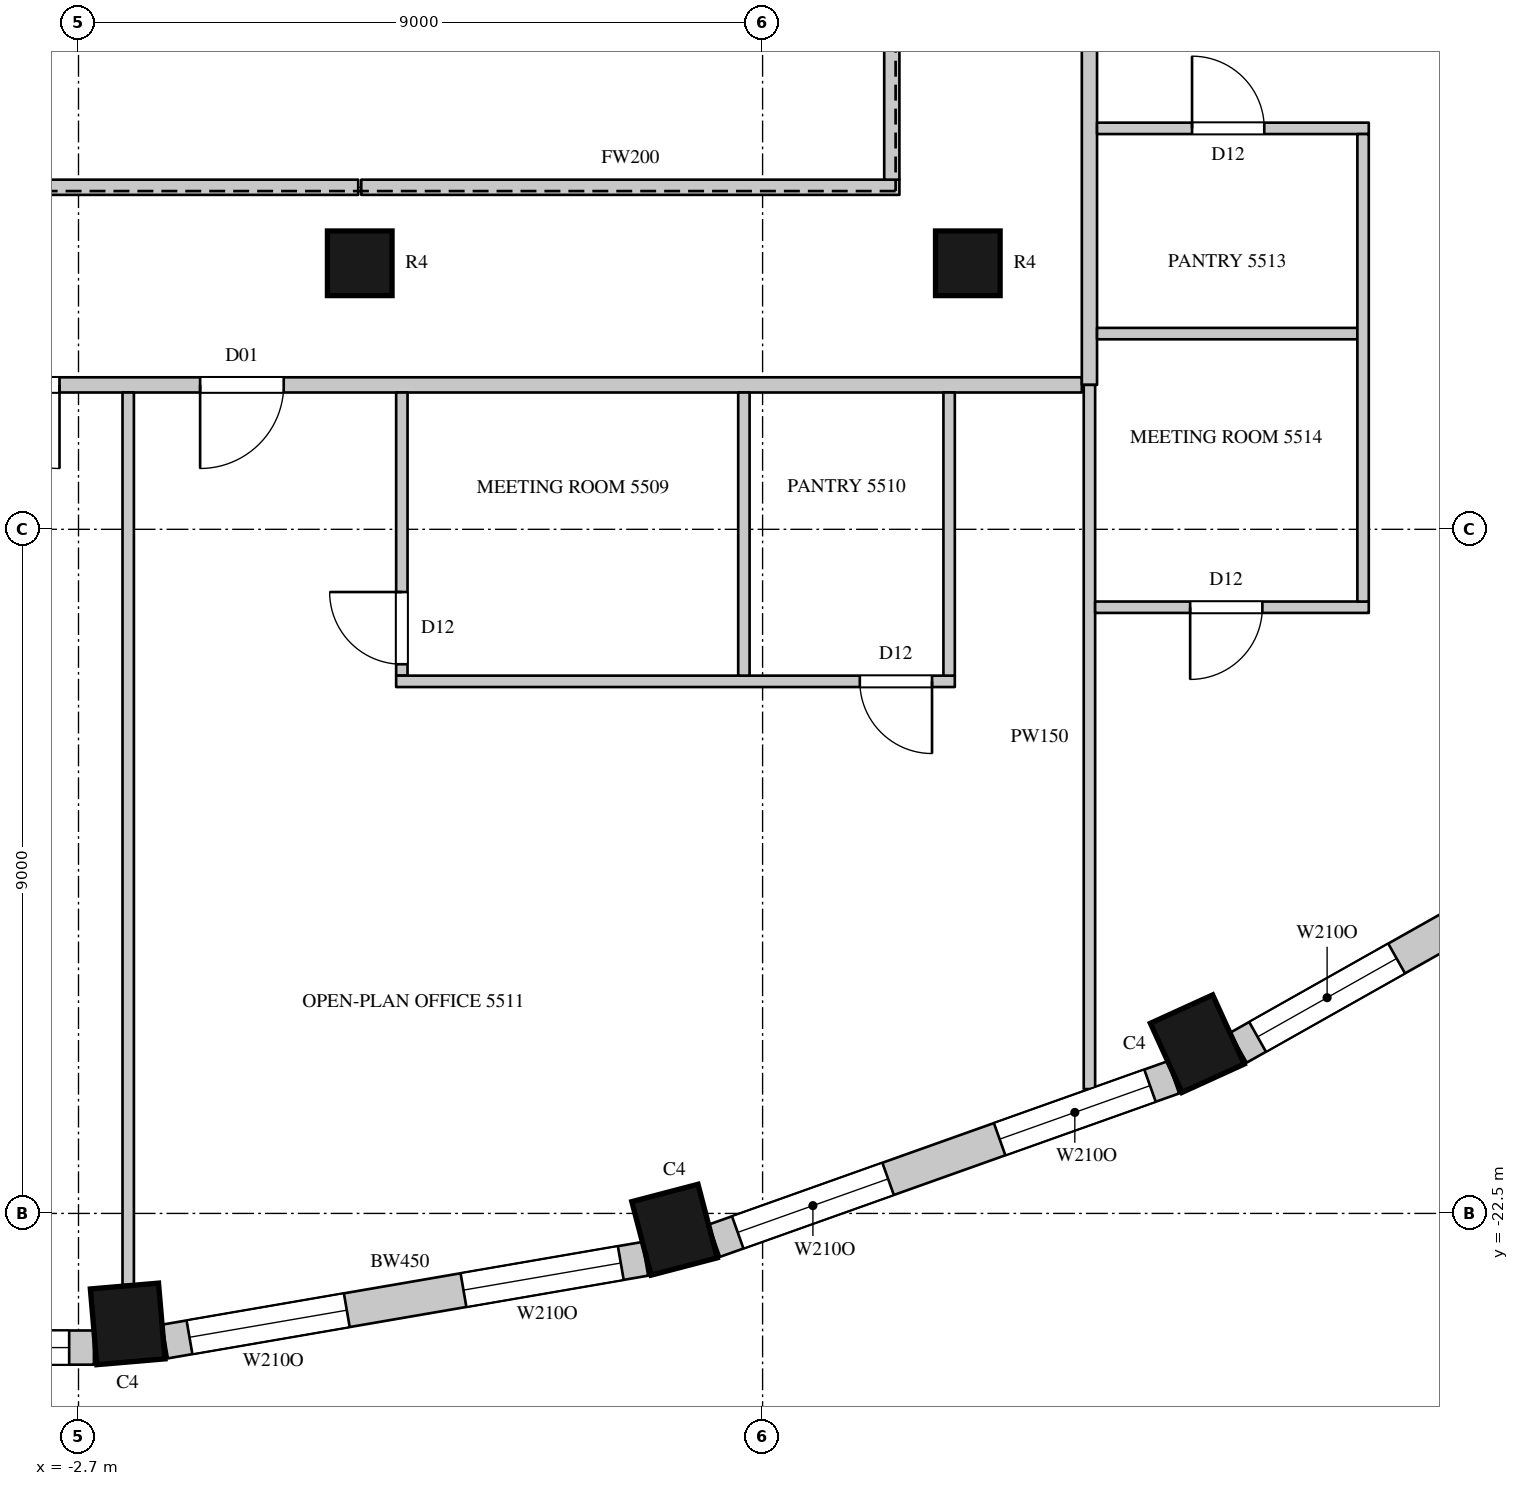
"""IFC4 building model, lengths in metres.
Left out: names, types, materials, properties, quantities, classifications, styles, units other than length and angle.
Written with IfcOpenShell. Run it as: python <this file> out.ifc"""

import sys

from ifc_helpers import new_model, si_unit, direction, frame, frame_2d, origin, origin_2d, place, context, subcontext, project, spatial, rectangle, circle, extrude, element, fill, save


model = new_model("IFC4")
c1 = context("Model", 3, precision=1e-05, world=origin(), true_north=direction((0.0, 1.0)))
c2 = subcontext(c1, "Body", "Model", "MODEL_VIEW")
j1 = project(units=[si_unit("LENGTHUNIT", "METRE"), si_unit("PLANEANGLEUNIT", "RADIAN")], contexts=[c1])
p1 = place(None, origin())
s1 = spatial("IfcSite", under=j1, at=p1, CompositionType="ELEMENT")
p2 = place(p1, origin())
s2 = spatial("IfcBuilding", under=s1, at=p2, CompositionType="ELEMENT")
p3 = place(p2, frame((0.0, 0.0, 247.5)))
s3 = spatial("IfcBuildingStorey", under=s2, at=p3, CompositionType="ELEMENT", Elevation=247.5)
for number, where, z_axis, x_axis in (
    (1, (-2.053, -23.954, 0.0), (0.0, 0.0, 1.0), (0.996, 0.085, 0.0)),
    (2, (5.142, -22.715, 0.0), (0.0, 0.0, 1.0), (0.967, 0.253, 0.0)),
    (3, (12.019, -20.267, 0.0), (0.0, 0.0, 1.0), (0.91, 0.415, 0.0)),
):
    element("IfcColumn", number, at=place(p3, frame(where, z_axis=z_axis, x_axis=x_axis)), inside=s3, PredefinedType="COLUMN", context=c2, shape_type="SweptSolid", body=[
        extrude(rectangle(XDim=0.9, YDim=1.0, at=origin_2d()), origin(), (0.0, 0.0, 1.0), 4.1),
    ])
for number, where, z_axis, x_axis in (
    (4, (1.0, -10.0, 0.0), (0.0, 0.0, 1.0), (1.0, 0.0, 0.0)),
    (5, (9.0, -10.0, 0.0), (0.0, 0.0, 1.0), (1.0, 0.0, 0.0)),
):
    element("IfcColumn", number, at=place(p3, frame(where, z_axis=z_axis, x_axis=x_axis)), inside=s3, PredefinedType="COLUMN", context=c2, shape_type="SweptSolid", body=[
        extrude(circle(Radius=0.425, at=origin_2d()), origin(), (0.0, 0.0, 1.0), 4.1),
    ])
p4 = place(p3, frame((-8.903, -24.265, 0.0), z_axis=(0.0, 0.0, 1.0), x_axis=(1.0, 0.0, 0.0)))
e6 = element("IfcWall", 6, at=p4, inside=s3, PredefinedType="SOLIDWALL", context=c2, shape_type="SweptSolid", body=[
    extrude(rectangle(XDim=6.406, YDim=0.45, at=frame_2d((3.203, 0.0))), origin(), (0.0, 0.0, 1.0), 3.8),
])
p5 = place(p4, frame((3.98, 0.0, 1.05)))
e7 = element("IfcOpeningElement", 7, at=p5, cuts=e6, PredefinedType="OPENING", context=c2, shape_type="SweptSolid", body=[
    extrude(rectangle(XDim=2.1, YDim=2.4, at=frame_2d((1.05, 1.2))), frame((0.0, 0.235, 0.0), z_axis=(0.0, -1.0, 0.0), x_axis=(1.0, 0.0, 0.0)), (0.0, 0.0, 1.0), 0.47),
])
p6 = place(p4, frame((1.214, 0.0, 1.05)))
e8 = element("IfcOpeningElement", 8, at=p6, cuts=e6, PredefinedType="OPENING", context=c2, shape_type="SweptSolid", body=[
    extrude(rectangle(XDim=1.2, YDim=2.4, at=frame_2d((0.6, 1.2))), frame((0.0, 0.235, 0.0), z_axis=(0.0, -1.0, 0.0), x_axis=(1.0, 0.0, 0.0)), (0.0, 0.0, 1.0), 0.47),
])
p7 = place(p3, frame((-1.562, -24.185, 0.0), z_axis=(0.0, 0.0, 1.0), x_axis=(0.985502073964, 0.169663379113, 0.0)))
e9 = element("IfcWall", 9, at=p7, inside=s3, PredefinedType="SOLIDWALL", context=c2, shape_type="SweptSolid", body=[
    extrude(rectangle(XDim=6.412, YDim=0.45, at=frame_2d((3.206, 0.0))), origin(), (0.0, 0.0, 1.0), 3.8),
])
p8 = place(p7, frame((0.327, 0.0, 1.05)))
e10 = element("IfcOpeningElement", 10, at=p8, cuts=e9, PredefinedType="OPENING", context=c2, shape_type="SweptSolid", body=[
    extrude(rectangle(XDim=2.1, YDim=2.4, at=frame_2d((1.05, 1.2))), frame((0.0, 0.235, 0.0), z_axis=(0.0, -1.0, 0.0), x_axis=(1.0, 0.0, 0.0)), (0.0, 0.0, 1.0), 0.47),
])
p9 = place(p7, frame((3.985, 0.0, 1.05)))
e11 = element("IfcOpeningElement", 11, at=p9, cuts=e9, PredefinedType="OPENING", context=c2, shape_type="SweptSolid", body=[
    extrude(rectangle(XDim=2.1, YDim=2.4, at=frame_2d((1.05, 1.2))), frame((0.0, 0.235, 0.0), z_axis=(0.0, -1.0, 0.0), x_axis=(1.0, 0.0, 0.0)), (0.0, 0.0, 1.0), 0.47),
])
p10 = place(p3, frame((5.665, -22.859, 0.0), z_axis=(0.0, 0.0, 1.0), x_axis=(0.942108340262, 0.335308626803, 0.0)))
e12 = element("IfcWall", 12, at=p10, inside=s3, PredefinedType="SOLIDWALL", context=c2, shape_type="SweptSolid", body=[
    extrude(rectangle(XDim=6.412, YDim=0.45, at=frame_2d((3.206, 0.0))), origin(), (0.0, 0.0, 1.0), 3.8),
])
p11 = place(p10, frame((0.327, 0.0, 1.05)))
e13 = element("IfcOpeningElement", 13, at=p11, cuts=e12, PredefinedType="OPENING", context=c2, shape_type="SweptSolid", body=[
    extrude(rectangle(XDim=2.1, YDim=2.4, at=frame_2d((1.05, 1.2))), frame((0.0, 0.235, 0.0), z_axis=(0.0, -1.0, 0.0), x_axis=(1.0, 0.0, 0.0)), (0.0, 0.0, 1.0), 0.47),
])
p12 = place(p10, frame((3.985, 0.0, 1.05)))
e14 = element("IfcOpeningElement", 14, at=p12, cuts=e12, PredefinedType="OPENING", context=c2, shape_type="SweptSolid", body=[
    extrude(rectangle(XDim=2.1, YDim=2.4, at=frame_2d((1.05, 1.2))), frame((0.0, 0.235, 0.0), z_axis=(0.0, -1.0, 0.0), x_axis=(1.0, 0.0, 0.0)), (0.0, 0.0, 1.0), 0.47),
])
p13 = place(p3, frame((12.559, -20.32, 0.0), z_axis=(0.0, 0.0, 1.0), x_axis=(0.871065783524, 0.491166367714, 0.0)))
e15 = element("IfcWall", 15, at=p13, inside=s3, PredefinedType="SOLIDWALL", context=c2, shape_type="SweptSolid", body=[
    extrude(rectangle(XDim=6.196, YDim=0.45, at=frame_2d((3.098, 0.0))), origin(), (0.0, 0.0, 1.0), 3.8),
])
p14 = place(p13, frame((0.291, 0.0, 1.05)))
e16 = element("IfcOpeningElement", 16, at=p14, cuts=e15, PredefinedType="OPENING", context=c2, shape_type="SweptSolid", body=[
    extrude(rectangle(XDim=2.1, YDim=2.4, at=frame_2d((1.05, 1.2))), frame((0.0, 0.235, 0.0), z_axis=(0.0, -1.0, 0.0), x_axis=(1.0, 0.0, 0.0)), (0.0, 0.0, 1.0), 0.47),
])
p15 = place(p13, frame((3.875, 0.0, 1.05)))
e17 = element("IfcOpeningElement", 17, at=p15, cuts=e15, PredefinedType="OPENING", context=c2, shape_type="SweptSolid", body=[
    extrude(rectangle(XDim=2.1, YDim=2.4, at=frame_2d((1.05, 1.2))), frame((0.0, 0.235, 0.0), z_axis=(0.0, -1.0, 0.0), x_axis=(1.0, 0.0, 0.0)), (0.0, 0.0, 1.0), 0.47),
])
p16 = place(p3, frame((-10.9, -11.6, 0.0), z_axis=(0.0, 0.0, 1.0), x_axis=(1.0, 0.0, 0.0)))
e18 = element("IfcWall", 18, at=p16, inside=s3, PredefinedType="PARTITIONING", context=c2, shape_type="SweptSolid", body=[
    extrude(rectangle(XDim=21.4, YDim=0.2, at=frame_2d((10.7, 0.0))), origin(), (0.0, 0.0, 1.0), 3.8),
])
p17 = place(p16, frame((0.95, 0.0, 0.0)))
e19 = element("IfcOpeningElement", 19, at=p17, cuts=e18, PredefinedType="OPENING", context=c2, shape_type="SweptSolid", body=[
    extrude(rectangle(XDim=0.9, YDim=2.2, at=frame_2d((0.45, 1.1))), frame((0.0, 0.11, 0.0), z_axis=(0.0, -1.0, 0.0), x_axis=(1.0, 0.0, 0.0)), (0.0, 0.0, 1.0), 0.22),
])
p18 = place(p16, frame((4.2, 0.0, 0.0)))
e20 = element("IfcOpeningElement", 20, at=p18, cuts=e18, PredefinedType="OPENING", context=c2, shape_type="SweptSolid", body=[
    extrude(rectangle(XDim=0.9, YDim=2.2, at=frame_2d((0.45, 1.1))), frame((0.0, 0.11, 0.0), z_axis=(0.0, -1.0, 0.0), x_axis=(1.0, 0.0, 0.0)), (0.0, 0.0, 1.0), 0.22),
])
p19 = place(p16, frame((6.85, 0.0, 0.0)))
e21 = element("IfcOpeningElement", 21, at=p19, cuts=e18, PredefinedType="OPENING", context=c2, shape_type="SweptSolid", body=[
    extrude(rectangle(XDim=1.1, YDim=2.4, at=frame_2d((0.55, 1.2))), frame((0.0, 0.11, 0.0), z_axis=(0.0, -1.0, 0.0), x_axis=(1.0, 0.0, 0.0)), (0.0, 0.0, 1.0), 0.22),
])
p20 = place(p16, frame((9.8, 0.0, 0.0)))
e22 = element("IfcOpeningElement", 22, at=p20, cuts=e18, PredefinedType="OPENING", context=c2, shape_type="SweptSolid", body=[
    extrude(rectangle(XDim=1.1, YDim=2.4, at=frame_2d((0.55, 1.2))), frame((0.0, 0.11, 0.0), z_axis=(0.0, -1.0, 0.0), x_axis=(1.0, 0.0, 0.0)), (0.0, 0.0, 1.0), 0.22),
])
for number, where, z_axis, x_axis in (
    (23, (-6.1, -9.0, 0.0), (0.0, 0.0, 1.0), (1.0, 0.0, 0.0)),
    (24, (1.02, -9.0, 0.0), (0.0, 0.0, 1.0), (1.0, 0.0, 0.0)),
):
    element("IfcWall", number, at=place(p3, frame(where, z_axis=z_axis, x_axis=x_axis)), inside=s3, PredefinedType="PARTITIONING", context=c2, shape_type="SweptSolid", body=[
        extrude(rectangle(XDim=7.08, YDim=0.2, at=frame_2d((3.54, 0.0))), origin(), (0.0, 0.0, 1.0), 3.8),
    ])
p21 = place(p3, frame((8.0, -8.9, 0.0), z_axis=(0.0, 0.0, 1.0), x_axis=(0.0, 1.0, 0.0)))
e25 = element("IfcWall", 25, at=p21, inside=s3, PredefinedType="PARTITIONING", context=c2, shape_type="SweptSolid", body=[
    extrude(rectangle(XDim=17.8, YDim=0.2, at=frame_2d((8.9, 0.0))), origin(), (0.0, 0.0, 1.0), 3.8),
])
p22 = place(p3, frame((10.6, -11.6, 0.0), z_axis=(0.0, 0.0, 1.0), x_axis=(0.0, 1.0, 0.0)))
e26 = element("IfcWall", 26, at=p22, inside=s3, PredefinedType="PARTITIONING", context=c2, shape_type="SweptSolid", body=[
    extrude(rectangle(XDim=23.7, YDim=0.2, at=frame_2d((11.85, 0.0))), origin(), (0.0, 0.0, 1.0), 3.8),
])
p23 = place(p22, frame((9.45, 0.0, 0.0)))
e27 = element("IfcOpeningElement", 27, at=p23, cuts=e26, PredefinedType="OPENING", context=c2, shape_type="SweptSolid", body=[
    extrude(rectangle(XDim=1.5, YDim=2.4, at=frame_2d((0.75, 1.2))), frame((0.0, 0.11, 0.0), z_axis=(0.0, -1.0, 0.0), x_axis=(1.0, 0.0, 0.0)), (0.0, 0.0, 1.0), 0.22),
])
p24 = place(p22, frame((19.45, 0.0, 0.0)))
e28 = element("IfcOpeningElement", 28, at=p24, cuts=e26, PredefinedType="OPENING", context=c2, shape_type="SweptSolid", body=[
    extrude(rectangle(XDim=1.1, YDim=2.4, at=frame_2d((0.55, 1.2))), frame((0.0, 0.11, 0.0), z_axis=(0.0, -1.0, 0.0), x_axis=(1.0, 0.0, 0.0)), (0.0, 0.0, 1.0), 0.22),
])
p25 = place(p22, frame((4.6, 0.0, 0.0)))
e29 = element("IfcOpeningElement", 29, at=p25, cuts=e26, PredefinedType="OPENING", context=c2, shape_type="SweptSolid", body=[
    extrude(rectangle(XDim=1.1, YDim=2.4, at=frame_2d((0.55, 1.2))), frame((0.0, 0.11, 0.0), z_axis=(0.0, -1.0, 0.0), x_axis=(1.0, 0.0, 0.0)), (0.0, 0.0, 1.0), 0.22),
])
p26 = place(p3, frame((-2.046, -23.441, 0.0), z_axis=(0.0, 0.0, 1.0), x_axis=(0.0, 1.0, 0.0)))
e30 = element("IfcWall", 30, at=p26, inside=s3, PredefinedType="PARTITIONING", context=c2, shape_type="SweptSolid", body=[
    extrude(rectangle(XDim=11.741, YDim=0.15, at=frame_2d((5.871, 0.0))), origin(), (0.0, 0.0, 1.0), 3.8),
])
p27 = place(p3, frame((1.554, -15.425, 0.0), z_axis=(0.0, 0.0, 1.0), x_axis=(0.0, 1.0, 0.0)))
e31 = element("IfcWall", 31, at=p27, inside=s3, PredefinedType="PARTITIONING", context=c2, shape_type="SweptSolid", body=[
    extrude(rectangle(XDim=3.725, YDim=0.15, at=frame_2d((1.863, 0.0))), origin(), (0.0, 0.0, 1.0), 3.8),
])
p28 = place(p27, frame((0.15, 0.0, 0.0)))
e32 = element("IfcOpeningElement", 32, at=p28, cuts=e31, PredefinedType="OPENING", context=c2, shape_type="SweptSolid", body=[
    extrude(rectangle(XDim=0.95, YDim=2.2, at=frame_2d((0.475, 1.1))), frame((0.0, 0.085, 0.0), z_axis=(0.0, -1.0, 0.0), x_axis=(1.0, 0.0, 0.0)), (0.0, 0.0, 1.0), 0.17),
])
p29 = place(p3, frame((1.479, -15.5, 0.0), z_axis=(0.0, 0.0, 1.0), x_axis=(1.0, 0.0, 0.0)))
e33 = element("IfcWall", 33, at=p29, inside=s3, PredefinedType="PARTITIONING", context=c2, shape_type="SweptSolid", body=[
    extrude(rectangle(XDim=7.35, YDim=0.15, at=frame_2d((3.675, 0.0))), origin(), (0.0, 0.0, 1.0), 3.8),
])
p30 = place(p29, frame((6.1, 0.0, 0.0)))
e34 = element("IfcOpeningElement", 34, at=p30, cuts=e33, PredefinedType="OPENING", context=c2, shape_type="SweptSolid", body=[
    extrude(rectangle(XDim=0.95, YDim=2.2, at=frame_2d((0.475, 1.1))), frame((0.0, 0.085, 0.0), z_axis=(0.0, -1.0, 0.0), x_axis=(1.0, 0.0, 0.0)), (0.0, 0.0, 1.0), 0.17),
])
for number, where, z_axis, x_axis in (
    (35, (6.054, -15.425, 0.0), (0.0, 0.0, 1.0), (0.0, 1.0, 0.0)),
    (36, (8.754, -15.425, 0.0), (0.0, 0.0, 1.0), (0.0, 1.0, 0.0)),
):
    element("IfcWall", number, at=place(p3, frame(where, z_axis=z_axis, x_axis=x_axis)), inside=s3, PredefinedType="PARTITIONING", context=c2, shape_type="SweptSolid", body=[
        extrude(rectangle(XDim=3.725, YDim=0.15, at=frame_2d((1.863, 0.0))), origin(), (0.0, 0.0, 1.0), 3.8),
    ])
p31 = place(p3, frame((10.6, -20.864, 0.0), z_axis=(0.0, 0.0, 1.0), x_axis=(0.0, 1.0, 0.0)))
e37 = element("IfcWall", 37, at=p31, inside=s3, PredefinedType="PARTITIONING", context=c2, shape_type="SweptSolid", body=[
    extrude(rectangle(XDim=9.264, YDim=0.15, at=frame_2d((4.632, 0.0))), origin(), (0.0, 0.0, 1.0), 3.8),
])
p32 = place(p3, frame((10.675, -14.525, 0.0), z_axis=(0.0, 0.0, 1.0), x_axis=(1.0, 0.0, 0.0)))
e38 = element("IfcWall", 38, at=p32, inside=s3, PredefinedType="PARTITIONING", context=c2, shape_type="SweptSolid", body=[
    extrude(rectangle(XDim=3.6, YDim=0.15, at=frame_2d((1.8, 0.0))), origin(), (0.0, 0.0, 1.0), 3.8),
])
p33 = place(p32, frame((1.25, 0.0, 0.0)))
e39 = element("IfcOpeningElement", 39, at=p33, cuts=e38, PredefinedType="OPENING", context=c2, shape_type="SweptSolid", body=[
    extrude(rectangle(XDim=0.95, YDim=2.2, at=frame_2d((0.475, 1.1))), frame((0.0, 0.085, 0.0), z_axis=(0.0, -1.0, 0.0), x_axis=(1.0, 0.0, 0.0)), (0.0, 0.0, 1.0), 0.17),
])
p34 = place(p3, frame((10.7, -10.925, 0.0), z_axis=(0.0, 0.0, 1.0), x_axis=(1.0, 0.0, 0.0)))
e40 = element("IfcWall", 40, at=p34, inside=s3, PredefinedType="PARTITIONING", context=c2, shape_type="SweptSolid", body=[
    extrude(rectangle(XDim=3.425, YDim=0.15, at=frame_2d((1.712, 0.0))), origin(), (0.0, 0.0, 1.0), 3.8),
])
p35 = place(p3, frame((10.7, -8.225, 0.0), z_axis=(0.0, 0.0, 1.0), x_axis=(1.0, 0.0, 0.0)))
e41 = element("IfcWall", 41, at=p35, inside=s3, PredefinedType="PARTITIONING", context=c2, shape_type="SweptSolid", body=[
    extrude(rectangle(XDim=3.575, YDim=0.15, at=frame_2d((1.788, 0.0))), origin(), (0.0, 0.0, 1.0), 3.15),
])
p36 = place(p35, frame((1.25, 0.0, 0.0)))
e42 = element("IfcOpeningElement", 42, at=p36, cuts=e41, PredefinedType="OPENING", context=c2, shape_type="SweptSolid", body=[
    extrude(rectangle(XDim=0.95, YDim=2.2, at=frame_2d((0.475, 1.1))), frame((0.0, 0.085, 0.0), z_axis=(0.0, -1.0, 0.0), x_axis=(1.0, 0.0, 0.0)), (0.0, 0.0, 1.0), 0.17),
])
p37 = place(p3, frame((14.2, -14.45, 0.0), z_axis=(0.0, 0.0, 1.0), x_axis=(0.0, 1.0, 0.0)))
e43 = element("IfcWall", 43, at=p37, inside=s3, PredefinedType="PARTITIONING", context=c2, shape_type="SweptSolid", body=[
    extrude(rectangle(XDim=6.15, YDim=0.15, at=frame_2d((3.075, 0.0))), origin(), (0.0, 0.0, 1.0), 3.8),
])
p38 = place(p5, origin())
e44 = element("IfcWindow", 44, at=p38, inside=s3, PartitioningType="SINGLE_PANEL", PredefinedType="WINDOW", context=c2, shape_type="SweptSolid", body=[
    extrude(rectangle(XDim=2.1, YDim=2.4, at=frame_2d((1.05, 1.2))), frame((0.0, 0.135, 0.0), z_axis=(0.0, -1.0, 0.0), x_axis=(1.0, 0.0, 0.0)), (0.0, 0.0, 1.0), 0.06),
])
fill(e7, e44)
p39 = place(p8, origin())
e45 = element("IfcWindow", 45, at=p39, inside=s3, PartitioningType="SINGLE_PANEL", PredefinedType="WINDOW", context=c2, shape_type="SweptSolid", body=[
    extrude(rectangle(XDim=2.1, YDim=2.4, at=frame_2d((1.05, 1.2))), frame((0.0, 0.135, 0.0), z_axis=(0.0, -1.0, 0.0), x_axis=(1.0, 0.0, 0.0)), (0.0, 0.0, 1.0), 0.06),
])
fill(e10, e45)
p40 = place(p9, origin())
e46 = element("IfcWindow", 46, at=p40, inside=s3, PartitioningType="SINGLE_PANEL", PredefinedType="WINDOW", context=c2, shape_type="SweptSolid", body=[
    extrude(rectangle(XDim=2.1, YDim=2.4, at=frame_2d((1.05, 1.2))), frame((0.0, 0.135, 0.0), z_axis=(0.0, -1.0, 0.0), x_axis=(1.0, 0.0, 0.0)), (0.0, 0.0, 1.0), 0.06),
])
fill(e11, e46)
p41 = place(p11, origin())
e47 = element("IfcWindow", 47, at=p41, inside=s3, PartitioningType="SINGLE_PANEL", PredefinedType="WINDOW", context=c2, shape_type="SweptSolid", body=[
    extrude(rectangle(XDim=2.1, YDim=2.4, at=frame_2d((1.05, 1.2))), frame((0.0, 0.135, 0.0), z_axis=(0.0, -1.0, 0.0), x_axis=(1.0, 0.0, 0.0)), (0.0, 0.0, 1.0), 0.06),
])
fill(e13, e47)
p42 = place(p12, origin())
e48 = element("IfcWindow", 48, at=p42, inside=s3, PartitioningType="SINGLE_PANEL", PredefinedType="WINDOW", context=c2, shape_type="SweptSolid", body=[
    extrude(rectangle(XDim=2.1, YDim=2.4, at=frame_2d((1.05, 1.2))), frame((0.0, 0.135, 0.0), z_axis=(0.0, -1.0, 0.0), x_axis=(1.0, 0.0, 0.0)), (0.0, 0.0, 1.0), 0.06),
])
fill(e14, e48)
p43 = place(p14, origin())
e49 = element("IfcWindow", 49, at=p43, inside=s3, PartitioningType="SINGLE_PANEL", PredefinedType="WINDOW", context=c2, shape_type="SweptSolid", body=[
    extrude(rectangle(XDim=2.1, YDim=2.4, at=frame_2d((1.05, 1.2))), frame((0.0, 0.135, 0.0), z_axis=(0.0, -1.0, 0.0), x_axis=(1.0, 0.0, 0.0)), (0.0, 0.0, 1.0), 0.06),
])
fill(e16, e49)
p44 = place(p19, origin())
e50 = element("IfcDoor", 50, at=p44, inside=s3, OperationType="SINGLE_SWING_LEFT", PredefinedType="DOOR", context=c2, shape_type="SweptSolid", body=[
    extrude(rectangle(XDim=1.1, YDim=2.4, at=frame_2d((0.55, 1.2))), frame((0.0, 0.025, 0.0), z_axis=(0.0, -1.0, 0.0), x_axis=(1.0, 0.0, 0.0)), (0.0, 0.0, 1.0), 0.05),
])
fill(e21, e50)
p45 = place(p20, origin())
e51 = element("IfcDoor", 51, at=p45, inside=s3, OperationType="SINGLE_SWING_RIGHT", PredefinedType="DOOR", context=c2, shape_type="SweptSolid", body=[
    extrude(rectangle(XDim=1.1, YDim=2.4, at=frame_2d((0.55, 1.2))), frame((0.0, 0.025, 0.0), z_axis=(0.0, -1.0, 0.0), x_axis=(1.0, 0.0, 0.0)), (0.0, 0.0, 1.0), 0.05),
])
fill(e22, e51)
p46 = place(p28, origin())
e52 = element("IfcDoor", 52, at=p46, inside=s3, OperationType="SINGLE_SWING_RIGHT", PredefinedType="DOOR", context=c2, shape_type="SweptSolid", body=[
    extrude(rectangle(XDim=0.95, YDim=2.2, at=frame_2d((0.475, 1.1))), frame((0.0, 0.025, 0.0), z_axis=(0.0, -1.0, 0.0), x_axis=(1.0, 0.0, 0.0)), (0.0, 0.0, 1.0), 0.05),
])
fill(e32, e52)
p47 = place(p30, origin())
e53 = element("IfcDoor", 53, at=p47, inside=s3, OperationType="SINGLE_SWING_LEFT", PredefinedType="DOOR", context=c2, shape_type="SweptSolid", body=[
    extrude(rectangle(XDim=0.95, YDim=2.2, at=frame_2d((0.475, 1.1))), frame((0.0, 0.025, 0.0), z_axis=(0.0, -1.0, 0.0), x_axis=(1.0, 0.0, 0.0)), (0.0, 0.0, 1.0), 0.05),
])
fill(e34, e53)
p48 = place(p36, origin())
e54 = element("IfcDoor", 54, at=p48, inside=s3, OperationType="SINGLE_SWING_LEFT", PredefinedType="DOOR", context=c2, shape_type="SweptSolid", body=[
    extrude(rectangle(XDim=0.95, YDim=2.2, at=frame_2d((0.475, 1.1))), frame((0.0, 0.025, 0.0), z_axis=(0.0, -1.0, 0.0), x_axis=(1.0, 0.0, 0.0)), (0.0, 0.0, 1.0), 0.05),
])
fill(e42, e54)
p49 = place(p33, origin())
e55 = element("IfcDoor", 55, at=p49, inside=s3, OperationType="SINGLE_SWING_RIGHT", PredefinedType="DOOR", context=c2, shape_type="SweptSolid", body=[
    extrude(rectangle(XDim=0.95, YDim=2.2, at=frame_2d((0.475, 1.1))), frame((0.0, 0.025, 0.0), z_axis=(0.0, -1.0, 0.0), x_axis=(1.0, 0.0, 0.0)), (0.0, 0.0, 1.0), 0.05),
])
fill(e39, e55)
save(model, sys.argv[1])
